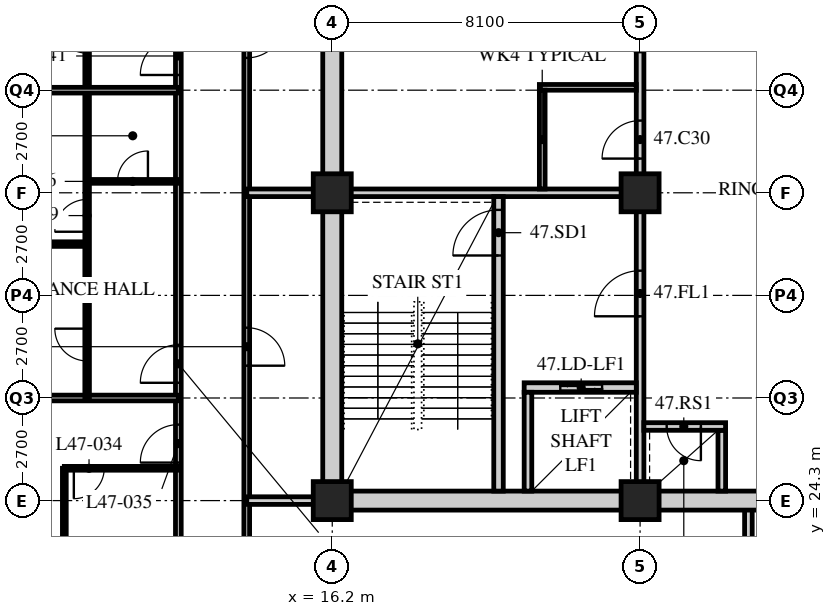
"""IFC4 building model, lengths in metres.
Left out: names, types, materials, properties, quantities, classifications, styles, units other than length and angle.
Written with IfcOpenShell. Run it as: python <this file> out.ifc"""

import sys

from ifc_helpers import new_model, si_unit, direction, frame, frame_2d, origin, origin_2d, place, context, subcontext, project, spatial, rectangle, hollow_rectangle, extrude, element, fill, save


model = new_model("IFC4")
c1 = context("Model", 3, precision=1e-05, world=origin(), true_north=direction((0.0, 1.0)))
c2 = subcontext(c1, "Body", "Model", "MODEL_VIEW")
j1 = project(units=[si_unit("LENGTHUNIT", "METRE"), si_unit("PLANEANGLEUNIT", "RADIAN")], contexts=[c1])
p1 = place(None, origin())
s1 = spatial("IfcSite", under=j1, at=p1, CompositionType="ELEMENT")
p2 = place(p1, origin())
s2 = spatial("IfcBuilding", under=s1, at=p2, CompositionType="ELEMENT")
p3 = place(p2, frame((0.0, 0.0, 184.8)))
s3 = spatial("IfcBuildingStorey", under=s2, at=p3, CompositionType="ELEMENT", Elevation=184.8)
for number, where, z_axis, x_axis in (
    (1, (16.2, 24.3, 0.0), (0.0, 0.0, 1.0), (1.0, 0.0, 0.0)),
    (2, (16.2, 32.4, 0.0), (0.0, 0.0, 1.0), (1.0, 0.0, 0.0)),
    (3, (24.3, 24.3, 0.0), (0.0, 0.0, 1.0), (1.0, 0.0, 0.0)),
    (4, (24.3, 32.4, 0.0), (0.0, 0.0, 1.0), (1.0, 0.0, 0.0)),
):
    element("IfcColumn", number, at=place(p3, frame(where, z_axis=z_axis, x_axis=x_axis)), inside=s3, PredefinedType="COLUMN", context=c2, shape_type="SweptSolid", body=[
        extrude(hollow_rectangle(XDim=1.0, YDim=1.0, WallThickness=0.1, at=origin_2d()), origin(), (0.0, 0.0, 1.0), 3.6),
    ])
p4 = place(p3, frame((12.15, 18.9, 0.0), z_axis=(0.0, 0.0, 1.0), x_axis=(0.0, 1.0, 0.0)))
e5 = element("IfcWall", 5, at=p4, inside=s3, PredefinedType="PARTITIONING", context=c2, shape_type="SweptSolid", body=[
    extrude(rectangle(XDim=28.35, YDim=0.15, at=frame_2d((14.175, 0.0))), origin(), (0.0, 0.0, 1.0), 3.39),
])
p5 = place(p4, frame((2.35, 0.0, 0.0)))
e6 = element("IfcOpeningElement", 6, at=p5, cuts=e5, PredefinedType="OPENING", context=c2, shape_type="SweptSolid", body=[
    extrude(rectangle(XDim=1.0, YDim=2.1, at=frame_2d((0.5, 1.05))), frame((0.0, 0.085, 0.0), z_axis=(0.0, -1.0, 0.0), x_axis=(1.0, 0.0, 0.0)), (0.0, 0.0, 1.0), 0.17),
])
p6 = place(p4, frame((6.4, 0.0, 0.0)))
e7 = element("IfcOpeningElement", 7, at=p6, cuts=e5, PredefinedType="OPENING", context=c2, shape_type="SweptSolid", body=[
    extrude(rectangle(XDim=1.0, YDim=2.1, at=frame_2d((0.5, 1.05))), frame((0.0, 0.085, 0.0), z_axis=(0.0, -1.0, 0.0), x_axis=(1.0, 0.0, 0.0)), (0.0, 0.0, 1.0), 0.17),
])
p7 = place(p4, frame((8.5, 0.0, 0.0)))
e8 = element("IfcOpeningElement", 8, at=p7, cuts=e5, PredefinedType="OPENING", context=c2, shape_type="SweptSolid", body=[
    extrude(rectangle(XDim=1.0, YDim=2.1, at=frame_2d((0.5, 1.05))), frame((0.0, 0.085, 0.0), z_axis=(0.0, -1.0, 0.0), x_axis=(1.0, 0.0, 0.0)), (0.0, 0.0, 1.0), 0.17),
])
p8 = place(p4, frame((16.6, 0.0, 0.0)))
e9 = element("IfcOpeningElement", 9, at=p8, cuts=e5, PredefinedType="OPENING", context=c2, shape_type="SweptSolid", body=[
    extrude(rectangle(XDim=1.0, YDim=2.1, at=frame_2d((0.5, 1.05))), frame((0.0, 0.085, 0.0), z_axis=(0.0, -1.0, 0.0), x_axis=(1.0, 0.0, 0.0)), (0.0, 0.0, 1.0), 0.17),
])
p9 = place(p4, frame((26.65, 0.0, 0.0)))
e10 = element("IfcOpeningElement", 10, at=p9, cuts=e5, PredefinedType="OPENING", context=c2, shape_type="SweptSolid", body=[
    extrude(rectangle(XDim=1.0, YDim=2.1, at=frame_2d((0.5, 1.05))), frame((0.0, 0.085, 0.0), z_axis=(0.0, -1.0, 0.0), x_axis=(1.0, 0.0, 0.0)), (0.0, 0.0, 1.0), 0.17),
])
p10 = place(p3, frame((13.95, 45.45, 0.0), z_axis=(0.0, 0.0, 1.0), x_axis=(0.0, -1.0, 0.0)))
e11 = element("IfcWall", 11, at=p10, inside=s3, PredefinedType="PARTITIONING", context=c2, shape_type="SweptSolid", body=[
    extrude(rectangle(XDim=24.75, YDim=0.15, at=frame_2d((12.375, 0.0))), origin(), (0.0, 0.0, 1.0), 3.39),
])
p11 = place(p10, frame((16.6, 0.0, 0.0)))
e12 = element("IfcOpeningElement", 12, at=p11, cuts=e11, PredefinedType="OPENING", context=c2, shape_type="SweptSolid", body=[
    extrude(rectangle(XDim=1.0, YDim=2.1, at=frame_2d((0.5, 1.05))), frame((0.0, 0.085, 0.0), z_axis=(0.0, -1.0, 0.0), x_axis=(1.0, 0.0, 0.0)), (0.0, 0.0, 1.0), 0.17),
])
p12 = place(p10, frame((8.5, 0.0, 0.0)))
e13 = element("IfcOpeningElement", 13, at=p12, cuts=e11, PredefinedType="OPENING", context=c2, shape_type="SweptSolid", body=[
    extrude(rectangle(XDim=1.0, YDim=2.1, at=frame_2d((0.5, 1.05))), frame((0.0, 0.085, 0.0), z_axis=(0.0, -1.0, 0.0), x_axis=(1.0, 0.0, 0.0)), (0.0, 0.0, 1.0), 0.17),
])
p13 = place(p3, frame((13.95, 32.4, 0.0), z_axis=(0.0, 0.0, 1.0), x_axis=(1.0, 0.0, 0.0)))
e14 = element("IfcWall", 14, at=p13, inside=s3, PredefinedType="SOLIDWALL", context=c2, shape_type="SweptSolid", body=[
    extrude(rectangle(XDim=2.25, YDim=0.2, at=frame_2d((1.125, 0.0))), origin(), (0.0, 0.0, 1.0), 3.39),
])
p14 = place(p3, frame((27.15, 20.7, 0.0), z_axis=(0.0, 0.0, 1.0), x_axis=(0.0, 1.0, 0.0)))
e15 = element("IfcWall", 15, at=p14, inside=s3, PredefinedType="SOLIDWALL", context=c2, shape_type="SweptSolid", body=[
    extrude(rectangle(XDim=3.6, YDim=0.2, at=frame_2d((1.8, 0.0))), origin(), (0.0, 0.0, 1.0), 3.39),
])
p15 = place(p3, frame((13.95, 24.3, 0.0), z_axis=(0.0, 0.0, 1.0), x_axis=(1.0, 0.0, 0.0)))
e16 = element("IfcWall", 16, at=p15, inside=s3, PredefinedType="SOLIDWALL", context=c2, shape_type="SweptSolid", body=[
    extrude(rectangle(XDim=2.25, YDim=0.2, at=frame_2d((1.125, 0.0))), origin(), (0.0, 0.0, 1.0), 3.39),
])
p16 = place(p3, frame((9.15, 22.95, 0.0), z_axis=(0.0, 0.0, 1.0), x_axis=(0.0, 1.0, 0.0)))
e17 = element("IfcWall", 17, at=p16, inside=s3, PredefinedType="PARTITIONING", context=c2, shape_type="SweptSolid", body=[
    extrude(rectangle(XDim=2.2, YDim=0.1, at=frame_2d((1.1, 0.0))), origin(), (0.0, 0.0, 1.0), 3.39),
])
p17 = place(p3, frame((12.15, 25.15, 0.0), z_axis=(0.0, 0.0, 1.0), x_axis=(-1.0, 0.0, 0.0)))
e18 = element("IfcWall", 18, at=p17, inside=s3, PredefinedType="PARTITIONING", context=c2, shape_type="SweptSolid", body=[
    extrude(rectangle(XDim=3.0, YDim=0.1, at=frame_2d((1.5, 0.0))), origin(), (0.0, 0.0, 1.0), 3.39),
])
p18 = place(p17, frame((1.95, 0.0, 0.0)))
e19 = element("IfcOpeningElement", 19, at=p18, cuts=e18, PredefinedType="OPENING", context=c2, shape_type="SweptSolid", body=[
    extrude(rectangle(XDim=0.8, YDim=2.1, at=frame_2d((0.4, 1.05))), frame((0.0, 0.06, 0.0), z_axis=(0.0, -1.0, 0.0), x_axis=(1.0, 0.0, 0.0)), (0.0, 0.0, 1.0), 0.12),
])
p19 = place(p3, frame((12.15, 27.0, 0.0), z_axis=(0.0, 0.0, 1.0), x_axis=(-1.0, 0.0, 0.0)))
e20 = element("IfcWall", 20, at=p19, inside=s3, PredefinedType="PARTITIONING", context=c2, shape_type="SweptSolid", body=[
    extrude(rectangle(XDim=11.85, YDim=0.15, at=frame_2d((5.925, 0.0))), origin(), (0.0, 0.0, 1.0), 2.778),
])
p20 = place(p3, frame((9.75, 27.0, 0.0), z_axis=(0.0, 0.0, 1.0), x_axis=(0.0, 1.0, 0.0)))
e21 = element("IfcWall", 21, at=p20, inside=s3, PredefinedType="PARTITIONING", context=c2, shape_type="SweptSolid", body=[
    extrude(rectangle(XDim=16.2, YDim=0.12, at=frame_2d((8.1, 0.0))), origin(), (0.0, 0.0, 1.0), 3.39),
])
p21 = place(p20, frame((0.975, 0.0, 0.0)))
e22 = element("IfcOpeningElement", 22, at=p21, cuts=e21, PredefinedType="OPENING", context=c2, shape_type="SweptSolid", body=[
    extrude(rectangle(XDim=0.85, YDim=2.1, at=frame_2d((0.425, 1.05))), frame((0.0, 0.07, 0.0), z_axis=(0.0, -1.0, 0.0), x_axis=(1.0, 0.0, 0.0)), (0.0, 0.0, 1.0), 0.14),
])
p22 = place(p20, frame((4.375, 0.0, 0.0)))
e23 = element("IfcOpeningElement", 23, at=p22, cuts=e21, PredefinedType="OPENING", context=c2, shape_type="SweptSolid", body=[
    extrude(rectangle(XDim=0.85, YDim=2.1, at=frame_2d((0.425, 1.05))), frame((0.0, 0.07, 0.0), z_axis=(0.0, -1.0, 0.0), x_axis=(1.0, 0.0, 0.0)), (0.0, 0.0, 1.0), 0.14),
])
p23 = place(p20, frame((9.075, 0.0, 0.0)))
e24 = element("IfcOpeningElement", 24, at=p23, cuts=e21, PredefinedType="OPENING", context=c2, shape_type="SweptSolid", body=[
    extrude(rectangle(XDim=0.85, YDim=2.1, at=frame_2d((0.425, 1.05))), frame((0.0, 0.07, 0.0), z_axis=(0.0, -1.0, 0.0), x_axis=(1.0, 0.0, 0.0)), (0.0, 0.0, 1.0), 0.14),
])
p24 = place(p20, frame((12.475, 0.0, 0.0)))
e25 = element("IfcOpeningElement", 25, at=p24, cuts=e21, PredefinedType="OPENING", context=c2, shape_type="SweptSolid", body=[
    extrude(rectangle(XDim=0.85, YDim=2.1, at=frame_2d((0.425, 1.05))), frame((0.0, 0.07, 0.0), z_axis=(0.0, -1.0, 0.0), x_axis=(1.0, 0.0, 0.0)), (0.0, 0.0, 1.0), 0.14),
])
p25 = place(p3, frame((12.15, 32.7, 0.0), z_axis=(0.0, 0.0, 1.0), x_axis=(-1.0, 0.0, 0.0)))
e26 = element("IfcWall", 26, at=p25, inside=s3, PredefinedType="PARTITIONING", context=c2, shape_type="SweptSolid", body=[
    extrude(rectangle(XDim=2.4, YDim=0.1, at=frame_2d((1.2, 0.0))), origin(), (0.0, 0.0, 1.0), 3.39),
])
p26 = place(p25, frame((0.8, 0.0, 0.0)))
e27 = element("IfcOpeningElement", 27, at=p26, cuts=e26, PredefinedType="OPENING", context=c2, shape_type="SweptSolid", body=[
    extrude(rectangle(XDim=0.8, YDim=2.1, at=frame_2d((0.4, 1.05))), frame((0.0, 0.06, 0.0), z_axis=(0.0, -1.0, 0.0), x_axis=(1.0, 0.0, 0.0)), (0.0, 0.0, 1.0), 0.12),
])
p27 = place(p3, frame((9.75, 31.05, 0.0), z_axis=(0.0, 0.0, 1.0), x_axis=(-1.0, 0.0, 0.0)))
e28 = element("IfcWall", 28, at=p27, inside=s3, PredefinedType="PARTITIONING", context=c2, shape_type="SweptSolid", body=[
    extrude(rectangle(XDim=9.45, YDim=0.12, at=frame_2d((4.725, 0.0))), origin(), (0.0, 0.0, 1.0), 3.39),
])
p28 = place(p3, frame((12.15, 35.1, 0.0), z_axis=(0.0, 0.0, 1.0), x_axis=(-1.0, 0.0, 0.0)))
e29 = element("IfcWall", 29, at=p28, inside=s3, PredefinedType="PARTITIONING", context=c2, shape_type="SweptSolid", body=[
    extrude(rectangle(XDim=11.85, YDim=0.15, at=frame_2d((5.925, 0.0))), origin(), (0.0, 0.0, 1.0), 2.778),
])
p29 = place(p3, frame((15.95, 24.3, 0.0), z_axis=(0.0, 0.0, 1.0), x_axis=(1.0, 0.0, 0.0)))
e30 = element("IfcWall", 30, at=p29, inside=s3, PredefinedType="SOLIDWALL", context=c2, shape_type="SweptSolid", body=[
    extrude(rectangle(XDim=24.8, YDim=0.5, at=frame_2d((12.4, 0.0))), origin(), (0.0, 0.0, 1.0), 2.74),
])
p30 = place(p29, frame((11.5, 0.0, 0.0)))
e31 = element("IfcOpeningElement", 31, at=p30, cuts=e30, PredefinedType="OPENING", context=c2, shape_type="SweptSolid", body=[
    extrude(rectangle(XDim=1.8, YDim=2.4, at=frame_2d((0.9, 1.2))), frame((0.0, 0.26, 0.0), z_axis=(0.0, -1.0, 0.0), x_axis=(1.0, 0.0, 0.0)), (0.0, 0.0, 1.0), 0.52),
])
p31 = place(p3, frame((16.2, 24.55, 0.0), z_axis=(0.0, 0.0, 1.0), x_axis=(0.0, 1.0, 0.0)))
e32 = element("IfcWall", 32, at=p31, inside=s3, PredefinedType="SOLIDWALL", context=c2, shape_type="SweptSolid", body=[
    extrude(rectangle(XDim=15.7, YDim=0.5, at=frame_2d((7.85, 0.0))), origin(), (0.0, 0.0, 1.0), 2.778),
])
p32 = place(p3, frame((16.45, 32.4, 0.0), z_axis=(0.0, 0.0, 1.0), x_axis=(1.0, 0.0, 0.0)))
e33 = element("IfcWall", 33, at=p32, inside=s3, PredefinedType="SOLIDWALL", context=c2, shape_type="SweptSolid", body=[
    extrude(rectangle(XDim=7.95, YDim=0.2, at=frame_2d((3.975, 0.0))), origin(), (0.0, 0.0, 1.0), 2.778),
])
p33 = place(p3, frame((24.3, 24.55, 0.0), z_axis=(0.0, 0.0, 1.0), x_axis=(0.0, 1.0, 0.0)))
e34 = element("IfcWall", 34, at=p33, inside=s3, PredefinedType="SOLIDWALL", context=c2, shape_type="SweptSolid", body=[
    extrude(rectangle(XDim=7.75, YDim=0.2, at=frame_2d((3.875, 0.0))), origin(), (0.0, 0.0, 1.0), 2.778),
])
p34 = place(p33, frame((4.6, 0.0, 0.0)))
e35 = element("IfcOpeningElement", 35, at=p34, cuts=e34, PredefinedType="OPENING", context=c2, shape_type="SweptSolid", body=[
    extrude(rectangle(XDim=1.2, YDim=2.1, at=frame_2d((0.6, 1.05))), frame((0.0, 0.11, 0.0), z_axis=(0.0, -1.0, 0.0), x_axis=(1.0, 0.0, 0.0)), (0.0, 0.0, 1.0), 0.22),
])
p35 = place(p3, frame((20.575, 24.55, 0.0), z_axis=(0.0, 0.0, 1.0), x_axis=(0.0, 1.0, 0.0)))
e36 = element("IfcWall", 36, at=p35, inside=s3, PredefinedType="SOLIDWALL", context=c2, shape_type="SweptSolid", body=[
    extrude(rectangle(XDim=7.75, YDim=0.25, at=frame_2d((3.875, 0.0))), origin(), (0.0, 0.0, 1.0), 3.39),
])
p36 = place(p35, frame((6.2, 0.0, 0.0)))
e37 = element("IfcOpeningElement", 37, at=p36, cuts=e36, PredefinedType="OPENING", context=c2, shape_type="SweptSolid", body=[
    extrude(rectangle(XDim=1.2, YDim=2.1, at=frame_2d((0.6, 1.05))), frame((0.0, 0.135, 0.0), z_axis=(0.0, -1.0, 0.0), x_axis=(1.0, 0.0, 0.0)), (0.0, 0.0, 1.0), 0.27),
])
p37 = place(p3, frame((21.25, 27.275, 0.0), z_axis=(0.0, 0.0, 1.0), x_axis=(1.0, 0.0, 0.0)))
e38 = element("IfcWall", 38, at=p37, inside=s3, PredefinedType="SOLIDWALL", context=c2, shape_type="SweptSolid", body=[
    extrude(rectangle(XDim=2.95, YDim=0.25, at=frame_2d((1.475, 0.0))), origin(), (0.0, 0.0, 1.0), 3.39),
])
p38 = place(p37, frame((0.95, 0.0, 0.0)))
e39 = element("IfcOpeningElement", 39, at=p38, cuts=e38, PredefinedType="OPENING", context=c2, shape_type="SweptSolid", body=[
    extrude(rectangle(XDim=1.1, YDim=2.4, at=frame_2d((0.55, 1.2))), frame((0.0, 0.135, 0.0), z_axis=(0.0, -1.0, 0.0), x_axis=(1.0, 0.0, 0.0)), (0.0, 0.0, 1.0), 0.27),
])
p39 = place(p3, frame((21.35, 24.55, 0.0), z_axis=(0.0, 0.0, 1.0), x_axis=(0.0, 1.0, 0.0)))
e40 = element("IfcWall", 40, at=p39, inside=s3, PredefinedType="SOLIDWALL", context=c2, shape_type="SweptSolid", body=[
    extrude(rectangle(XDim=2.6, YDim=0.2, at=frame_2d((1.3, 0.0))), origin(), (0.0, 0.0, 1.0), 3.39),
])
p40 = place(p3, frame((26.45, 24.55, 0.0), z_axis=(0.0, 0.0, 1.0), x_axis=(0.0, 1.0, 0.0)))
e41 = element("IfcWall", 41, at=p40, inside=s3, PredefinedType="SOLIDWALL", context=c2, shape_type="SweptSolid", body=[
    extrude(rectangle(XDim=1.6, YDim=0.2, at=frame_2d((0.8, 0.0))), origin(), (0.0, 0.0, 1.0), 3.39),
])
p41 = place(p3, frame((24.4, 26.25, 0.0), z_axis=(0.0, 0.0, 1.0), x_axis=(1.0, 0.0, 0.0)))
e42 = element("IfcWall", 42, at=p41, inside=s3, PredefinedType="SOLIDWALL", context=c2, shape_type="SweptSolid", body=[
    extrude(rectangle(XDim=2.15, YDim=0.2, at=frame_2d((1.075, 0.0))), origin(), (0.0, 0.0, 1.0), 3.39),
])
p42 = place(p41, frame((0.6, 0.0, 0.0)))
e43 = element("IfcOpeningElement", 43, at=p42, cuts=e42, PredefinedType="OPENING", context=c2, shape_type="SweptSolid", body=[
    extrude(rectangle(XDim=0.9, YDim=2.1, at=frame_2d((0.45, 1.05))), frame((0.0, 0.11, 0.0), z_axis=(0.0, -1.0, 0.0), x_axis=(1.0, 0.0, 0.0)), (0.0, 0.0, 1.0), 0.22),
])
p43 = place(p3, frame((24.3, 32.5, 0.0), z_axis=(0.0, 0.0, 1.0), x_axis=(0.0, 1.0, 0.0)))
e44 = element("IfcWall", 44, at=p43, inside=s3, PredefinedType="PARTITIONING", context=c2, shape_type="SweptSolid", body=[
    extrude(rectangle(XDim=7.75, YDim=0.2, at=frame_2d((3.875, 0.0))), origin(), (0.0, 0.0, 1.0), 2.778),
])
p44 = place(p43, frame((0.8, 0.0, 0.0)))
e45 = element("IfcOpeningElement", 45, at=p44, cuts=e44, PredefinedType="OPENING", context=c2, shape_type="SweptSolid", body=[
    extrude(rectangle(XDim=1.0, YDim=2.1, at=frame_2d((0.5, 1.05))), frame((0.0, 0.11, 0.0), z_axis=(0.0, -1.0, 0.0), x_axis=(1.0, 0.0, 0.0)), (0.0, 0.0, 1.0), 0.22),
])
p45 = place(p43, frame((3.6, 0.0, 0.0)))
e46 = element("IfcOpeningElement", 46, at=p45, cuts=e44, PredefinedType="OPENING", context=c2, shape_type="SweptSolid", body=[
    extrude(rectangle(XDim=0.9, YDim=2.1, at=frame_2d((0.45, 1.05))), frame((0.0, 0.11, 0.0), z_axis=(0.0, -1.0, 0.0), x_axis=(1.0, 0.0, 0.0)), (0.0, 0.0, 1.0), 0.22),
])
p46 = place(p43, frame((6.175, 0.0, 0.0)))
e47 = element("IfcOpeningElement", 47, at=p46, cuts=e44, PredefinedType="OPENING", context=c2, shape_type="SweptSolid", body=[
    extrude(rectangle(XDim=0.9, YDim=2.1, at=frame_2d((0.45, 1.05))), frame((0.0, 0.11, 0.0), z_axis=(0.0, -1.0, 0.0), x_axis=(1.0, 0.0, 0.0)), (0.0, 0.0, 1.0), 0.22),
])
p47 = place(p3, frame((21.65, 35.175, 0.0), z_axis=(0.0, 0.0, 1.0), x_axis=(1.0, 0.0, 0.0)))
e48 = element("IfcWall", 48, at=p47, inside=s3, PredefinedType="PARTITIONING", context=c2, shape_type="SweptSolid", body=[
    extrude(rectangle(XDim=2.55, YDim=0.15, at=frame_2d((1.275, 0.0))), origin(), (0.0, 0.0, 1.0), 3.39),
])
p48 = place(p3, frame((21.725, 32.5, 0.0), z_axis=(0.0, 0.0, 1.0), x_axis=(0.0, 1.0, 0.0)))
e49 = element("IfcWall", 49, at=p48, inside=s3, PredefinedType="PARTITIONING", context=c2, shape_type="SweptSolid", body=[
    extrude(rectangle(XDim=2.6, YDim=0.15, at=frame_2d((1.3, 0.0))), origin(), (0.0, 0.0, 1.0), 3.39),
])
p49 = place(p11, origin())
e50 = element("IfcDoor", 50, at=p49, inside=s3, OperationType="SINGLE_SWING_RIGHT", PredefinedType="DOOR", context=c2, shape_type="SweptSolid", body=[
    extrude(rectangle(XDim=1.0, YDim=2.1, at=frame_2d((0.5, 1.05))), frame((0.0, 0.025, 0.0), z_axis=(0.0, -1.0, 0.0), x_axis=(1.0, 0.0, 0.0)), (0.0, 0.0, 1.0), 0.05),
])
fill(e12, e50)
p50 = place(p12, origin())
e51 = element("IfcDoor", 51, at=p50, inside=s3, OperationType="SINGLE_SWING_LEFT", PredefinedType="DOOR", context=c2, shape_type="SweptSolid", body=[
    extrude(rectangle(XDim=1.0, YDim=2.1, at=frame_2d((0.5, 1.05))), frame((0.0, 0.025, 0.0), z_axis=(0.0, -1.0, 0.0), x_axis=(1.0, 0.0, 0.0)), (0.0, 0.0, 1.0), 0.05),
])
fill(e13, e51)
p51 = place(p18, origin())
e52 = element("IfcDoor", 52, at=p51, inside=s3, OperationType="SINGLE_SWING_RIGHT", PredefinedType="DOOR", context=c2, shape_type="SweptSolid", body=[
    extrude(rectangle(XDim=0.8, YDim=2.1, at=frame_2d((0.4, 1.05))), frame((0.0, 0.025, 0.0), z_axis=(0.0, -1.0, 0.0), x_axis=(1.0, 0.0, 0.0)), (0.0, 0.0, 1.0), 0.05),
])
fill(e19, e52)
p52 = place(p6, origin())
e53 = element("IfcDoor", 53, at=p52, inside=s3, OperationType="SINGLE_SWING_LEFT", PredefinedType="DOOR", context=c2, shape_type="SweptSolid", body=[
    extrude(rectangle(XDim=1.0, YDim=2.1, at=frame_2d((0.5, 1.05))), frame((0.0, 0.025, 0.0), z_axis=(0.0, -1.0, 0.0), x_axis=(1.0, 0.0, 0.0)), (0.0, 0.0, 1.0), 0.05),
])
fill(e7, e53)
p53 = place(p26, origin())
e54 = element("IfcDoor", 54, at=p53, inside=s3, OperationType="SINGLE_SWING_RIGHT", PredefinedType="DOOR", context=c2, shape_type="SweptSolid", body=[
    extrude(rectangle(XDim=0.8, YDim=2.1, at=frame_2d((0.4, 1.05))), frame((0.0, 0.025, 0.0), z_axis=(0.0, -1.0, 0.0), x_axis=(1.0, 0.0, 0.0)), (0.0, 0.0, 1.0), 0.05),
])
fill(e27, e54)
p54 = place(p7, origin())
e55 = element("IfcDoor", 55, at=p54, inside=s3, OperationType="SINGLE_SWING_LEFT", PredefinedType="DOOR", context=c2, shape_type="SweptSolid", body=[
    extrude(rectangle(XDim=1.0, YDim=2.1, at=frame_2d((0.5, 1.05))), frame((0.0, 0.025, 0.0), z_axis=(0.0, -1.0, 0.0), x_axis=(1.0, 0.0, 0.0)), (0.0, 0.0, 1.0), 0.05),
])
fill(e8, e55)
p55 = place(p21, origin())
e56 = element("IfcDoor", 56, at=p55, inside=s3, OperationType="SINGLE_SWING_RIGHT", PredefinedType="DOOR", context=c2, shape_type="SweptSolid", body=[
    extrude(rectangle(XDim=0.85, YDim=2.1, at=frame_2d((0.425, 1.05))), frame((0.0, 0.025, 0.0), z_axis=(0.0, -1.0, 0.0), x_axis=(1.0, 0.0, 0.0)), (0.0, 0.0, 1.0), 0.05),
])
fill(e22, e56)
p56 = place(p22, origin())
e57 = element("IfcDoor", 57, at=p56, inside=s3, OperationType="SINGLE_SWING_LEFT", PredefinedType="DOOR", context=c2, shape_type="SweptSolid", body=[
    extrude(rectangle(XDim=0.85, YDim=2.1, at=frame_2d((0.425, 1.05))), frame((0.0, 0.025, 0.0), z_axis=(0.0, -1.0, 0.0), x_axis=(1.0, 0.0, 0.0)), (0.0, 0.0, 1.0), 0.05),
])
fill(e23, e57)
p57 = place(p8, origin())
e58 = element("IfcDoor", 58, at=p57, inside=s3, OperationType="SINGLE_SWING_LEFT", PredefinedType="DOOR", context=c2, shape_type="SweptSolid", body=[
    extrude(rectangle(XDim=1.0, YDim=2.1, at=frame_2d((0.5, 1.05))), frame((0.0, 0.025, 0.0), z_axis=(0.0, -1.0, 0.0), x_axis=(1.0, 0.0, 0.0)), (0.0, 0.0, 1.0), 0.05),
])
fill(e9, e58)
p58 = place(p23, origin())
e59 = element("IfcDoor", 59, at=p58, inside=s3, OperationType="SINGLE_SWING_RIGHT", PredefinedType="DOOR", context=c2, shape_type="SweptSolid", body=[
    extrude(rectangle(XDim=0.85, YDim=2.1, at=frame_2d((0.425, 1.05))), frame((0.0, 0.025, 0.0), z_axis=(0.0, -1.0, 0.0), x_axis=(1.0, 0.0, 0.0)), (0.0, 0.0, 1.0), 0.05),
])
fill(e24, e59)
p59 = place(p44, origin())
e60 = element("IfcDoor", 60, at=p59, inside=s3, OperationType="SINGLE_SWING_LEFT", PredefinedType="DOOR", context=c2, shape_type="SweptSolid", body=[
    extrude(rectangle(XDim=1.0, YDim=2.1, at=frame_2d((0.5, 1.05))), frame((0.0, 0.025, 0.0), z_axis=(0.0, -1.0, 0.0), x_axis=(1.0, 0.0, 0.0)), (0.0, 0.0, 1.0), 0.05),
])
fill(e45, e60)
p60 = place(p36, origin())
e61 = element("IfcDoor", 61, at=p60, inside=s3, OperationType="SINGLE_SWING_LEFT", PredefinedType="DOOR", context=c2, shape_type="SweptSolid", body=[
    extrude(rectangle(XDim=1.2, YDim=2.1, at=frame_2d((0.6, 1.05))), frame((0.0, 0.025, 0.0), z_axis=(0.0, -1.0, 0.0), x_axis=(1.0, 0.0, 0.0)), (0.0, 0.0, 1.0), 0.05),
])
fill(e37, e61)
p61 = place(p34, origin())
e62 = element("IfcDoor", 62, at=p61, inside=s3, OperationType="SINGLE_SWING_LEFT", PredefinedType="DOOR", context=c2, shape_type="SweptSolid", body=[
    extrude(rectangle(XDim=1.2, YDim=2.1, at=frame_2d((0.6, 1.05))), frame((0.0, 0.025, 0.0), z_axis=(0.0, -1.0, 0.0), x_axis=(1.0, 0.0, 0.0)), (0.0, 0.0, 1.0), 0.05),
])
fill(e35, e62)
p62 = place(p42, origin())
e63 = element("IfcDoor", 63, at=p62, inside=s3, OperationType="SINGLE_SWING_LEFT", PredefinedType="DOOR", context=c2, shape_type="SweptSolid", body=[
    extrude(rectangle(XDim=0.9, YDim=2.1, at=frame_2d((0.45, 1.05))), frame((0.0, 0.025, 0.0), z_axis=(0.0, -1.0, 0.0), x_axis=(1.0, 0.0, 0.0)), (0.0, 0.0, 1.0), 0.05),
])
fill(e43, e63)
p63 = place(p38, origin())
e64 = element("IfcDoor", 64, at=p63, inside=s3, OperationType="DOUBLE_DOOR_SLIDING", PredefinedType="DOOR", context=c2, shape_type="SweptSolid", body=[
    extrude(rectangle(XDim=1.1, YDim=2.4, at=frame_2d((0.55, 1.2))), frame((0.0, 0.025, 0.0), z_axis=(0.0, -1.0, 0.0), x_axis=(1.0, 0.0, 0.0)), (0.0, 0.0, 1.0), 0.05),
])
fill(e39, e64)
save(model, sys.argv[1])
